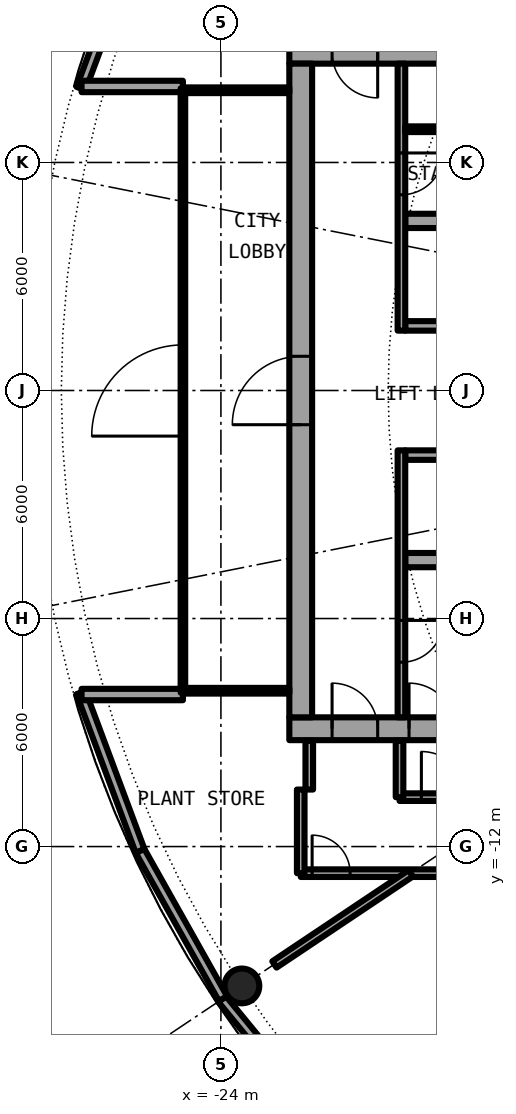
"""IFC4 building model, lengths in metres.
Left out: names, types, materials, properties, quantities, classifications, styles, units other than length and angle.
Written with IfcOpenShell. Run it as: python <this file> out.ifc"""

import sys

from ifc_helpers import new_model, si_unit, direction, frame, frame_2d, origin, origin_2d, place, context, subcontext, project, spatial, rectangle, hollow_circle, extrude, element, fill, save


model = new_model("IFC4")
c1 = context("Model", 3, precision=1e-05, world=origin(), true_north=direction((0.0, 1.0)))
c2 = subcontext(c1, "Body", "Model", "MODEL_VIEW")
j1 = project(units=[si_unit("LENGTHUNIT", "METRE"), si_unit("PLANEANGLEUNIT", "RADIAN")], contexts=[c1])
p1 = place(None, origin())
s1 = spatial("IfcSite", under=j1, at=p1, CompositionType="ELEMENT")
p2 = place(p1, origin())
s2 = spatial("IfcBuilding", under=s1, at=p2, CompositionType="ELEMENT")
p3 = place(p2, frame((0.0, 0.0, 103.25)))
s3 = spatial("IfcBuildingStorey", under=s2, at=p3, CompositionType="ELEMENT", Elevation=103.25)
p4 = place(p3, frame((-23.448, -15.667, 0.0), z_axis=(0.0, 0.0, 1.0), x_axis=(1.0, 0.0, 0.0)))
e1 = element("IfcColumn", 1, at=p4, inside=s3, PredefinedType="COLUMN", context=c2, shape_type="SweptSolid", body=[
    extrude(hollow_circle(Radius=0.457, WallThickness=0.04, at=origin_2d()), origin(), (0.0, 0.0, 1.0), 4.2),
])
p5 = place(p3, frame((-23.967, -16.014, 0.0), z_axis=(0.0, 0.0, 1.0), x_axis=(0.634403999748, -0.773001659186, 0.0)))
e2 = element("IfcWall", 2, at=p5, inside=s3, PredefinedType="SOLIDWALL", context=c2, shape_type="SweptSolid", body=[
    extrude(rectangle(XDim=5.651, YDim=0.25, at=frame_2d((2.825, 0.0))), origin(), (0.0, 0.0, 1.0), 3.85),
])
p6 = place(p3, frame((-27.682, -7.945, 0.0), z_axis=(0.0, 0.0, 1.0), x_axis=(0.349247811493, -0.937030397675, 0.0)))
e3 = element("IfcWall", 3, at=p6, inside=s3, PredefinedType="SOLIDWALL", context=c2, shape_type="SweptSolid", body=[
    extrude(rectangle(XDim=4.452, YDim=0.25, at=frame_2d((2.226, 0.0))), origin(), (0.0, 0.0, 1.0), 3.85),
])
p7 = place(p3, frame((-26.127, -12.117, 0.0), z_axis=(0.0, 0.0, 1.0), x_axis=(0.489696356642, -0.871893042919, 0.0)))
e4 = element("IfcWall", 4, at=p7, inside=s3, PredefinedType="SOLIDWALL", context=c2, shape_type="SweptSolid", body=[
    extrude(rectangle(XDim=4.454, YDim=0.25, at=frame_2d((2.227, 0.0))), origin(), (0.0, 0.0, 1.0), 3.85),
])
p8 = place(p3, frame((-26.127, 12.117, 0.0), z_axis=(0.0, 0.0, 1.0), x_axis=(-0.349247811493, -0.937030397675, 0.0)))
e5 = element("IfcWall", 5, at=p8, inside=s3, PredefinedType="SOLIDWALL", context=c2, shape_type="SweptSolid", body=[
    extrude(rectangle(XDim=4.452, YDim=0.25, at=frame_2d((2.226, 0.0))), origin(), (0.0, 0.0, 1.0), 3.85),
])
for number, where, z_axis, x_axis in (
    (6, (-25.0, 8.0, 0.0), (0.0, 0.0, 1.0), (-1.0, 0.0, 0.0)),
    (7, (-25.0, -8.0, 0.0), (0.0, 0.0, 1.0), (-1.0, 0.0, 0.0)),
):
    element("IfcWall", number, at=place(p3, frame(where, z_axis=z_axis, x_axis=x_axis)), inside=s3, PredefinedType="SOLIDWALL", context=c2, shape_type="SweptSolid", body=[
        extrude(rectangle(XDim=2.667, YDim=0.3, at=frame_2d((1.333, 0.0))), origin(), (0.0, 0.0, 1.0), 3.85),
    ])
p9 = place(p3, frame((-22.2, -8.9, 0.0), z_axis=(0.0, 0.0, 1.0), x_axis=(1.0, 0.0, 0.0)))
e8 = element("IfcWall", 8, at=p9, inside=s3, PredefinedType="SHEAR", context=c2, shape_type="SweptSolid", body=[
    extrude(rectangle(XDim=13.8, YDim=0.6, at=frame_2d((6.9, 0.0))), origin(), (0.0, 0.0, 1.0), 4.2),
])
p10 = place(p9, frame((1.125, 0.0, 0.0)))
e9 = element("IfcOpeningElement", 9, at=p10, cuts=e8, PredefinedType="OPENING", context=c2, shape_type="SweptSolid", body=[
    extrude(rectangle(XDim=1.2, YDim=2.3, at=frame_2d((0.6, 1.15))), frame((0.0, 0.31, 0.0), z_axis=(0.0, -1.0, 0.0), x_axis=(1.0, 0.0, 0.0)), (0.0, 0.0, 1.0), 0.62),
])
p11 = place(p9, frame((3.15, 0.0, 0.0)))
e10 = element("IfcOpeningElement", 10, at=p11, cuts=e8, PredefinedType="OPENING", context=c2, shape_type="SweptSolid", body=[
    extrude(rectangle(XDim=1.2, YDim=2.3, at=frame_2d((0.6, 1.15))), frame((0.0, 0.31, 0.0), z_axis=(0.0, -1.0, 0.0), x_axis=(1.0, 0.0, 0.0)), (0.0, 0.0, 1.0), 0.62),
])
p12 = place(p3, frame((-8.4, 8.9, 0.0), z_axis=(0.0, 0.0, 1.0), x_axis=(-1.0, 0.0, 0.0)))
e11 = element("IfcWall", 11, at=p12, inside=s3, PredefinedType="SHEAR", context=c2, shape_type="SweptSolid", body=[
    extrude(rectangle(XDim=13.8, YDim=0.6, at=frame_2d((6.9, 0.0))), origin(), (0.0, 0.0, 1.0), 4.2),
])
p13 = place(p12, frame((11.475, 0.0, 0.0)))
e12 = element("IfcOpeningElement", 12, at=p13, cuts=e11, PredefinedType="OPENING", context=c2, shape_type="SweptSolid", body=[
    extrude(rectangle(XDim=1.2, YDim=2.3, at=frame_2d((0.6, 1.15))), frame((0.0, 0.31, 0.0), z_axis=(0.0, -1.0, 0.0), x_axis=(1.0, 0.0, 0.0)), (0.0, 0.0, 1.0), 0.62),
])
p14 = place(p3, frame((-21.9, -8.6, 0.0), z_axis=(0.0, 0.0, 1.0), x_axis=(0.0, 1.0, 0.0)))
e13 = element("IfcWall", 13, at=p14, inside=s3, PredefinedType="SHEAR", context=c2, shape_type="SweptSolid", body=[
    extrude(rectangle(XDim=17.2, YDim=0.6, at=frame_2d((8.6, 0.0))), origin(), (0.0, 0.0, 1.0), 4.2),
])
p15 = place(p14, frame((7.7, 0.0, 0.0)))
e14 = element("IfcOpeningElement", 14, at=p15, cuts=e13, PredefinedType="OPENING", context=c2, shape_type="SweptSolid", body=[
    extrude(rectangle(XDim=1.8, YDim=2.3, at=frame_2d((0.9, 1.15))), frame((0.0, 0.31, 0.0), z_axis=(0.0, -1.0, 0.0), x_axis=(1.0, 0.0, 0.0)), (0.0, 0.0, 1.0), 0.62),
])
p16 = place(p3, frame((-9.0, -1.7, 0.0), z_axis=(0.0, 0.0, 1.0), x_axis=(-1.0, 0.0, 0.0)))
e15 = element("IfcWall", 15, at=p16, inside=s3, PredefinedType="SHEAR", context=c2, shape_type="SweptSolid", body=[
    extrude(rectangle(XDim=10.15, YDim=0.25, at=frame_2d((5.075, 0.0))), origin(), (0.0, 0.0, 1.0), 4.2),
])
p17 = place(p16, frame((0.387, 0.0, 0.0)))
e16 = element("IfcOpeningElement", 16, at=p17, cuts=e15, PredefinedType="OPENING", context=c2, shape_type="SweptSolid", body=[
    extrude(rectangle(XDim=1.1, YDim=2.3, at=frame_2d((0.55, 1.15))), frame((0.0, 0.135, 0.0), z_axis=(0.0, -1.0, 0.0), x_axis=(1.0, 0.0, 0.0)), (0.0, 0.0, 1.0), 0.27),
])
p18 = place(p16, frame((2.45, 0.0, 0.0)))
e17 = element("IfcOpeningElement", 17, at=p18, cuts=e15, PredefinedType="OPENING", context=c2, shape_type="SweptSolid", body=[
    extrude(rectangle(XDim=1.1, YDim=2.3, at=frame_2d((0.55, 1.15))), frame((0.0, 0.135, 0.0), z_axis=(0.0, -1.0, 0.0), x_axis=(1.0, 0.0, 0.0)), (0.0, 0.0, 1.0), 0.27),
])
p19 = place(p16, frame((4.45, 0.0, 0.0)))
e18 = element("IfcOpeningElement", 18, at=p19, cuts=e15, PredefinedType="OPENING", context=c2, shape_type="SweptSolid", body=[
    extrude(rectangle(XDim=1.1, YDim=2.3, at=frame_2d((0.55, 1.15))), frame((0.0, 0.135, 0.0), z_axis=(0.0, -1.0, 0.0), x_axis=(1.0, 0.0, 0.0)), (0.0, 0.0, 1.0), 0.27),
])
p20 = place(p3, frame((-9.0, -4.462, 0.0), z_axis=(0.0, 0.0, 1.0), x_axis=(-1.0, 0.0, 0.0)))
e19 = element("IfcWall", 19, at=p20, inside=s3, PredefinedType="SHEAR", context=c2, shape_type="SweptSolid", body=[
    extrude(rectangle(XDim=10.15, YDim=0.375, at=frame_2d((5.075, 0.0))), origin(), (0.0, 0.0, 1.0), 4.2),
])
p21 = place(p20, frame((6.6, 0.0, 0.0)))
e20 = element("IfcOpeningElement", 20, at=p21, cuts=e19, PredefinedType="OPENING", context=c2, shape_type="SweptSolid", body=[
    extrude(rectangle(XDim=1.1, YDim=2.3, at=frame_2d((0.55, 1.15))), frame((0.0, 0.198, 0.0), z_axis=(0.0, -1.0, 0.0), x_axis=(1.0, 0.0, 0.0)), (0.0, 0.0, 1.0), 0.395),
])
p22 = place(p3, frame((-19.25, -1.575, 0.0), z_axis=(0.0, 0.0, 1.0), x_axis=(0.0, -1.0, 0.0)))
e21 = element("IfcWall", 21, at=p22, inside=s3, PredefinedType="SOLIDWALL", context=c2, shape_type="SweptSolid", body=[
    extrude(rectangle(XDim=7.025, YDim=0.2, at=frame_2d((3.513, 0.0))), origin(), (0.0, 0.0, 1.0), 3.85),
])
p23 = place(p22, frame((4.475, 0.0, 0.0)))
e22 = element("IfcOpeningElement", 22, at=p23, cuts=e21, PredefinedType="OPENING", context=c2, shape_type="SweptSolid", body=[
    extrude(rectangle(XDim=1.1, YDim=2.3, at=frame_2d((0.55, 1.15))), frame((0.0, 0.11, 0.0), z_axis=(0.0, -1.0, 0.0), x_axis=(1.0, 0.0, 0.0)), (0.0, 0.0, 1.0), 0.22),
])
p24 = place(p3, frame((-19.15, 1.7, 0.0), z_axis=(0.0, 0.0, 1.0), x_axis=(1.0, 0.0, 0.0)))
e23 = element("IfcWall", 23, at=p24, inside=s3, PredefinedType="SHEAR", context=c2, shape_type="SweptSolid", body=[
    extrude(rectangle(XDim=10.15, YDim=0.25, at=frame_2d((5.075, 0.0))), origin(), (0.0, 0.0, 1.0), 4.2),
])
p25 = place(p24, frame((2.45, 0.0, 0.0)))
e24 = element("IfcOpeningElement", 24, at=p25, cuts=e23, PredefinedType="OPENING", context=c2, shape_type="SweptSolid", body=[
    extrude(rectangle(XDim=1.1, YDim=2.3, at=frame_2d((0.55, 1.15))), frame((0.0, 0.135, 0.0), z_axis=(0.0, -1.0, 0.0), x_axis=(1.0, 0.0, 0.0)), (0.0, 0.0, 1.0), 0.27),
])
p26 = place(p24, frame((7.637, 0.0, 0.0)))
e25 = element("IfcOpeningElement", 25, at=p26, cuts=e23, PredefinedType="OPENING", context=c2, shape_type="SweptSolid", body=[
    extrude(rectangle(XDim=0.9, YDim=2.3, at=frame_2d((0.45, 1.15))), frame((0.0, 0.135, 0.0), z_axis=(0.0, -1.0, 0.0), x_axis=(1.0, 0.0, 0.0)), (0.0, 0.0, 1.0), 0.27),
])
p27 = place(p24, frame((4.625, 0.0, 0.0)))
e26 = element("IfcOpeningElement", 26, at=p27, cuts=e23, PredefinedType="OPENING", context=c2, shape_type="SweptSolid", body=[
    extrude(rectangle(XDim=0.9, YDim=2.3, at=frame_2d((0.45, 1.15))), frame((0.0, 0.135, 0.0), z_axis=(0.0, -1.0, 0.0), x_axis=(1.0, 0.0, 0.0)), (0.0, 0.0, 1.0), 0.27),
])
p28 = place(p3, frame((-9.0, 4.462, 0.0), z_axis=(0.0, 0.0, 1.0), x_axis=(-1.0, 0.0, 0.0)))
e27 = element("IfcWall", 27, at=p28, inside=s3, PredefinedType="SHEAR", context=c2, shape_type="SweptSolid", body=[
    extrude(rectangle(XDim=10.15, YDim=0.375, at=frame_2d((5.075, 0.0))), origin(), (0.0, 0.0, 1.0), 4.2),
])
p29 = place(p3, frame((-19.25, 8.6, 0.0), z_axis=(0.0, 0.0, 1.0), x_axis=(0.0, -1.0, 0.0)))
e28 = element("IfcWall", 28, at=p29, inside=s3, PredefinedType="SOLIDWALL", context=c2, shape_type="SweptSolid", body=[
    extrude(rectangle(XDim=7.025, YDim=0.2, at=frame_2d((3.513, 0.0))), origin(), (0.0, 0.0, 1.0), 3.85),
])
p30 = place(p29, frame((2.35, 0.0, 0.0)))
e29 = element("IfcOpeningElement", 29, at=p30, cuts=e28, PredefinedType="OPENING", context=c2, shape_type="SweptSolid", body=[
    extrude(rectangle(XDim=1.1, YDim=2.3, at=frame_2d((0.55, 1.15))), frame((0.0, 0.11, 0.0), z_axis=(0.0, -1.0, 0.0), x_axis=(1.0, 0.0, 0.0)), (0.0, 0.0, 1.0), 0.22),
])
p31 = place(p3, frame((-15.45, 6.875, 0.0), z_axis=(0.0, 0.0, 1.0), x_axis=(-1.0, 0.0, 0.0)))
e30 = element("IfcWall", 30, at=p31, inside=s3, PredefinedType="PARTITIONING", context=c2, shape_type="SweptSolid", body=[
    extrude(rectangle(XDim=3.7, YDim=0.15, at=frame_2d((1.85, 0.0))), origin(), (0.0, 0.0, 1.0), 3.85),
])
p32 = place(p31, frame((1.4, 0.0, 0.0)))
e31 = element("IfcOpeningElement", 31, at=p32, cuts=e30, PredefinedType="OPENING", context=c2, shape_type="SweptSolid", body=[
    extrude(rectangle(XDim=0.9, YDim=2.3, at=frame_2d((0.45, 1.15))), frame((0.0, 0.085, 0.0), z_axis=(0.0, -1.0, 0.0), x_axis=(1.0, 0.0, 0.0)), (0.0, 0.0, 1.0), 0.17),
])
for number, where, z_axis, x_axis in (
    (32, (-22.2, 7.9, 0.0), (0.0, 0.0, 1.0), (-1.0, 0.0, 0.0)),
    (33, (-22.2, -7.9, 0.0), (0.0, 0.0, 1.0), (-1.0, 0.0, 0.0)),
):
    element("IfcWall", number, at=place(p3, frame(where, z_axis=z_axis, x_axis=x_axis)), inside=s3, PredefinedType="PARTITIONING", context=c2, shape_type="SweptSolid", body=[
        extrude(rectangle(XDim=2.74, YDim=0.15, at=frame_2d((1.37, 0.0))), origin(), (0.0, 0.0, 1.0), 3.85),
    ])
p33 = place(p3, frame((-25.0, -7.95, 0.0), z_axis=(0.0, 0.0, 1.0), x_axis=(0.0, 1.0, 0.0)))
e34 = element("IfcWall", 34, at=p33, inside=s3, PredefinedType="PARTITIONING", context=c2, shape_type="SweptSolid", body=[
    extrude(rectangle(XDim=15.9, YDim=0.12, at=frame_2d((7.95, 0.0))), origin(), (0.0, 0.0, 1.0), 3.85),
])
p34 = place(p33, frame((6.75, 0.0, 0.0)))
e35 = element("IfcOpeningElement", 35, at=p34, cuts=e34, PredefinedType="OPENING", context=c2, shape_type="SweptSolid", body=[
    extrude(rectangle(XDim=2.4, YDim=2.3, at=frame_2d((1.2, 1.15))), frame((0.0, 0.07, 0.0), z_axis=(0.0, -1.0, 0.0), x_axis=(1.0, 0.0, 0.0)), (0.0, 0.0, 1.0), 0.14),
])
p35 = place(p33, frame((11.55, 0.0, 0.1)))
e36 = element("IfcOpeningElement", 36, at=p35, cuts=e34, PredefinedType="OPENING", context=c2, shape_type="SweptSolid", body=[
    extrude(rectangle(XDim=3.4, YDim=3.5, at=frame_2d((1.7, 1.75))), frame((0.0, 0.07, 0.0), z_axis=(0.0, -1.0, 0.0), x_axis=(1.0, 0.0, 0.0)), (0.0, 0.0, 1.0), 0.14),
])
p36 = place(p33, frame((0.95, 0.0, 0.1)))
e37 = element("IfcOpeningElement", 37, at=p36, cuts=e34, PredefinedType="OPENING", context=c2, shape_type="SweptSolid", body=[
    extrude(rectangle(XDim=3.4, YDim=3.5, at=frame_2d((1.7, 1.75))), frame((0.0, 0.07, 0.0), z_axis=(0.0, -1.0, 0.0), x_axis=(1.0, 0.0, 0.0)), (0.0, 0.0, 1.0), 0.14),
])
p37 = place(p3, frame((-21.9, -12.7, 0.0), z_axis=(0.0, 0.0, 1.0), x_axis=(1.0, 0.0, 0.0)))
e38 = element("IfcWall", 38, at=p37, inside=s3, PredefinedType="PARTITIONING", context=c2, shape_type="SweptSolid", body=[
    extrude(rectangle(XDim=7.165, YDim=0.2, at=frame_2d((3.583, 0.0))), origin(), (0.0, 0.0, 1.0), 3.85),
])
p38 = place(p37, frame((0.3, 0.0, 0.0)))
e39 = element("IfcOpeningElement", 39, at=p38, cuts=e38, PredefinedType="OPENING", context=c2, shape_type="SweptSolid", body=[
    extrude(rectangle(XDim=1.0, YDim=2.3, at=frame_2d((0.5, 1.15))), frame((0.0, 0.11, 0.0), z_axis=(0.0, -1.0, 0.0), x_axis=(1.0, 0.0, 0.0)), (0.0, 0.0, 1.0), 0.22),
])
p39 = place(p3, frame((-19.3, -10.7, 0.0), z_axis=(0.0, 0.0, 1.0), x_axis=(1.0, 0.0, 0.0)))
e40 = element("IfcWall", 40, at=p39, inside=s3, PredefinedType="PARTITIONING", context=c2, shape_type="SweptSolid", body=[
    extrude(rectangle(XDim=2.35, YDim=0.2, at=frame_2d((1.175, 0.0))), origin(), (0.0, 0.0, 1.0), 3.85),
])
p40 = place(p39, frame((0.575, 0.0, 0.0)))
e41 = element("IfcOpeningElement", 41, at=p40, cuts=e40, PredefinedType="OPENING", context=c2, shape_type="SweptSolid", body=[
    extrude(rectangle(XDim=1.2, YDim=2.3, at=frame_2d((0.6, 1.15))), frame((0.0, 0.11, 0.0), z_axis=(0.0, -1.0, 0.0), x_axis=(1.0, 0.0, 0.0)), (0.0, 0.0, 1.0), 0.22),
])
p41 = place(p3, frame((-22.592, -15.102, 0.0), z_axis=(0.0, 0.0, 1.0), x_axis=(0.831423131448, 0.555639790235, 0.0)))
e42 = element("IfcWall", 42, at=p41, inside=s3, PredefinedType="PARTITIONING", context=c2, shape_type="SweptSolid", body=[
    extrude(rectangle(XDim=4.316, YDim=0.2, at=frame_2d((2.158, 0.0))), origin(), (0.0, 0.0, 1.0), 3.85),
])
p42 = place(p3, frame((-19.3, -10.7, 0.0), z_axis=(0.0, 0.0, 1.0), x_axis=(0.0, 1.0, 0.0)))
e43 = element("IfcWall", 43, at=p42, inside=s3, PredefinedType="PARTITIONING", context=c2, shape_type="SweptSolid", body=[
    extrude(rectangle(XDim=1.48, YDim=0.2, at=frame_2d((0.74, 0.0))), origin(), (0.0, 0.0, 1.0), 3.85),
])
p43 = place(p3, frame((-21.675, -10.5, 0.0), z_axis=(0.0, 0.0, 1.0), x_axis=(0.0, 1.0, 0.0)))
e44 = element("IfcWall", 44, at=p43, inside=s3, PredefinedType="PARTITIONING", context=c2, shape_type="SweptSolid", body=[
    extrude(rectangle(XDim=1.28, YDim=0.2, at=frame_2d((0.64, 0.0))), origin(), (0.0, 0.0, 1.0), 3.85),
])
p44 = place(p3, frame((-21.9, -12.7, 0.0), z_axis=(0.0, 0.0, 1.0), x_axis=(0.0, 1.0, 0.0)))
e45 = element("IfcWall", 45, at=p44, inside=s3, PredefinedType="PARTITIONING", context=c2, shape_type="SweptSolid", body=[
    extrude(rectangle(XDim=2.2, YDim=0.2, at=frame_2d((1.1, 0.0))), origin(), (0.0, 0.0, 1.0), 3.85),
])
p45 = place(p23, origin())
e46 = element("IfcDoor", 46, at=p45, inside=s3, OperationType="SINGLE_SWING_LEFT", PredefinedType="DOOR", context=c2, shape_type="SweptSolid", body=[
    extrude(rectangle(XDim=1.1, YDim=2.3, at=frame_2d((0.55, 1.15))), frame((0.0, 0.025, 0.0), z_axis=(0.0, -1.0, 0.0), x_axis=(1.0, 0.0, 0.0)), (0.0, 0.0, 1.0), 0.05),
])
fill(e22, e46)
p46 = place(p30, origin())
e47 = element("IfcDoor", 47, at=p46, inside=s3, OperationType="SINGLE_SWING_RIGHT", PredefinedType="DOOR", context=c2, shape_type="SweptSolid", body=[
    extrude(rectangle(XDim=1.1, YDim=2.3, at=frame_2d((0.55, 1.15))), frame((0.0, 0.025, 0.0), z_axis=(0.0, -1.0, 0.0), x_axis=(1.0, 0.0, 0.0)), (0.0, 0.0, 1.0), 0.05),
])
fill(e29, e47)
p47 = place(p10, origin())
e48 = element("IfcDoor", 48, at=p47, inside=s3, OperationType="SINGLE_SWING_RIGHT", PredefinedType="DOOR", context=c2, shape_type="SweptSolid", body=[
    extrude(rectangle(XDim=1.2, YDim=2.3, at=frame_2d((0.6, 1.15))), frame((0.0, 0.025, 0.0), z_axis=(0.0, -1.0, 0.0), x_axis=(1.0, 0.0, 0.0)), (0.0, 0.0, 1.0), 0.05),
])
fill(e9, e48)
p48 = place(p13, origin())
e49 = element("IfcDoor", 49, at=p48, inside=s3, OperationType="SINGLE_SWING_LEFT", PredefinedType="DOOR", context=c2, shape_type="SweptSolid", body=[
    extrude(rectangle(XDim=1.2, YDim=2.3, at=frame_2d((0.6, 1.15))), frame((0.0, 0.025, 0.0), z_axis=(0.0, -1.0, 0.0), x_axis=(1.0, 0.0, 0.0)), (0.0, 0.0, 1.0), 0.05),
])
fill(e12, e49)
p49 = place(p11, origin())
e50 = element("IfcDoor", 50, at=p49, inside=s3, OperationType="SINGLE_SWING_RIGHT", PredefinedType="DOOR", context=c2, shape_type="SweptSolid", body=[
    extrude(rectangle(XDim=1.2, YDim=2.3, at=frame_2d((0.6, 1.15))), frame((0.0, 0.025, 0.0), z_axis=(0.0, -1.0, 0.0), x_axis=(1.0, 0.0, 0.0)), (0.0, 0.0, 1.0), 0.05),
])
fill(e10, e50)
p50 = place(p15, origin())
e51 = element("IfcDoor", 51, at=p50, inside=s3, OperationType="SINGLE_SWING_LEFT", PredefinedType="DOOR", context=c2, shape_type="SweptSolid", body=[
    extrude(rectangle(XDim=1.8, YDim=2.3, at=frame_2d((0.9, 1.15))), frame((0.0, 0.025, 0.0), z_axis=(0.0, -1.0, 0.0), x_axis=(1.0, 0.0, 0.0)), (0.0, 0.0, 1.0), 0.05),
])
fill(e14, e51)
p51 = place(p34, origin())
e52 = element("IfcDoor", 52, at=p51, inside=s3, OperationType="SINGLE_SWING_LEFT", PredefinedType="DOOR", context=c2, shape_type="SweptSolid", body=[
    extrude(rectangle(XDim=2.4, YDim=2.3, at=frame_2d((1.2, 1.15))), frame((0.0, 0.025, 0.0), z_axis=(0.0, -1.0, 0.0), x_axis=(1.0, 0.0, 0.0)), (0.0, 0.0, 1.0), 0.05),
])
fill(e35, e52)
p52 = place(p35, origin())
e53 = element("IfcWindow", 53, at=p52, inside=s3, PartitioningType="SINGLE_PANEL", PredefinedType="WINDOW", context=c2, shape_type="SweptSolid", body=[
    extrude(rectangle(XDim=3.4, YDim=3.5, at=frame_2d((1.7, 1.75))), frame((0.0, 0.03, 0.0), z_axis=(0.0, -1.0, 0.0), x_axis=(1.0, 0.0, 0.0)), (0.0, 0.0, 1.0), 0.06),
])
fill(e36, e53)
p53 = place(p36, origin())
e54 = element("IfcWindow", 54, at=p53, inside=s3, PartitioningType="SINGLE_PANEL", PredefinedType="WINDOW", context=c2, shape_type="SweptSolid", body=[
    extrude(rectangle(XDim=3.4, YDim=3.5, at=frame_2d((1.7, 1.75))), frame((0.0, 0.03, 0.0), z_axis=(0.0, -1.0, 0.0), x_axis=(1.0, 0.0, 0.0)), (0.0, 0.0, 1.0), 0.06),
])
fill(e37, e54)
p54 = place(p40, origin())
e55 = element("IfcDoor", 55, at=p54, inside=s3, OperationType="SINGLE_SWING_LEFT", PredefinedType="DOOR", context=c2, shape_type="SweptSolid", body=[
    extrude(rectangle(XDim=1.2, YDim=2.3, at=frame_2d((0.6, 1.15))), frame((0.0, 0.025, 0.0), z_axis=(0.0, -1.0, 0.0), x_axis=(1.0, 0.0, 0.0)), (0.0, 0.0, 1.0), 0.05),
])
fill(e41, e55)
p55 = place(p38, origin())
e56 = element("IfcDoor", 56, at=p55, inside=s3, OperationType="SINGLE_SWING_LEFT", PredefinedType="DOOR", context=c2, shape_type="SweptSolid", body=[
    extrude(rectangle(XDim=1.0, YDim=2.3, at=frame_2d((0.5, 1.15))), frame((0.0, 0.025, 0.0), z_axis=(0.0, -1.0, 0.0), x_axis=(1.0, 0.0, 0.0)), (0.0, 0.0, 1.0), 0.05),
])
fill(e39, e56)
save(model, sys.argv[1])
